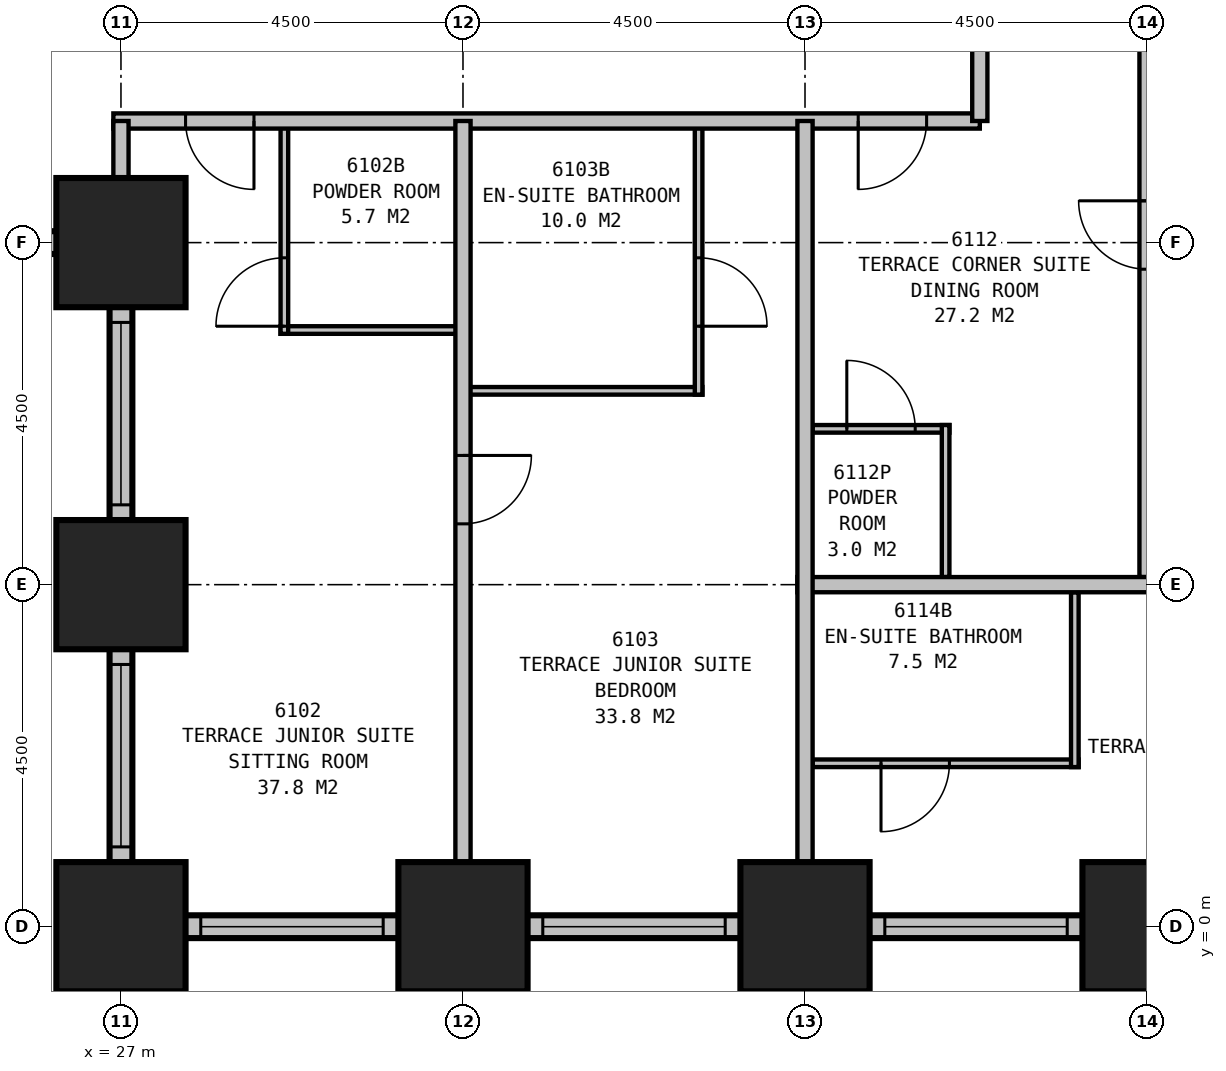
"""IFC4 building model, lengths in metres.
Left out: names, types, materials, properties, quantities, classifications, styles, units other than length and angle.
Written with IfcOpenShell. Run it as: python <this file> out.ifc"""

import sys

from ifc_helpers import new_model, si_unit, direction, frame, frame_2d, origin, origin_2d, place, context, subcontext, project, spatial, rectangle, extrude, element, fill, save


model = new_model("IFC4")
c1 = context("Model", 3, precision=1e-05, world=origin(), true_north=direction((0.0, 1.0)))
c2 = subcontext(c1, "Body", "Model", "MODEL_VIEW")
j1 = project(units=[si_unit("LENGTHUNIT", "METRE"), si_unit("PLANEANGLEUNIT", "RADIAN")], contexts=[c1])
p1 = place(None, origin())
s1 = spatial("IfcSite", under=j1, at=p1, CompositionType="ELEMENT")
p2 = place(p1, origin())
s2 = spatial("IfcBuilding", under=s1, at=p2, CompositionType="ELEMENT")
p3 = place(p2, frame((0.0, 0.0, 236.9)))
s3 = spatial("IfcBuildingStorey", under=s2, at=p3, CompositionType="ELEMENT", Elevation=236.9)
for number, where, z_axis, x_axis in (
    (1, (27.0, 9.0, 0.0), (0.0, 0.0, 1.0), (1.0, 0.0, 0.0)),
    (2, (27.0, 4.5, 0.0), (0.0, 0.0, 1.0), (1.0, 0.0, 0.0)),
    (3, (27.0, 0.0, 0.0), (0.0, 0.0, 1.0), (1.0, 0.0, 0.0)),
    (4, (31.5, 0.0, 0.0), (0.0, 0.0, 1.0), (1.0, 0.0, 0.0)),
    (5, (36.0, 0.0, 0.0), (0.0, 0.0, 1.0), (1.0, 0.0, 0.0)),
    (6, (40.5, 0.0, 0.0), (0.0, 0.0, 1.0), (1.0, 0.0, 0.0)),
):
    element("IfcColumn", number, at=place(p3, frame(where, z_axis=z_axis, x_axis=x_axis)), inside=s3, PredefinedType="COLUMN", context=c2, shape_type="SweptSolid", body=[
        extrude(rectangle(XDim=1.7, YDim=1.7, at=origin_2d()), origin(), (0.0, 0.0, 1.0), 3.9),
    ])
p4 = place(p3, frame((9.85, 9.0, 0.0), z_axis=(0.0, 0.0, 1.0), x_axis=(1.0, 0.0, 0.0)))
e7 = element("IfcWall", 7, at=p4, inside=s3, PredefinedType="STANDARD", context=c2, shape_type="SweptSolid", body=[
    extrude(rectangle(XDim=17.3, YDim=0.3, at=frame_2d((8.65, 0.0))), origin(), (0.0, 0.0, 1.0), 2.5),
])
p5 = place(p4, frame((1.15, 0.0, 0.5)))
e8 = element("IfcOpeningElement", 8, at=p5, cuts=e7, PredefinedType="OPENING", context=c2, shape_type="SweptSolid", body=[
    extrude(rectangle(XDim=1.5, YDim=1.85, at=frame_2d((0.75, 0.925))), frame((0.0, 0.16, 0.0), z_axis=(0.0, -1.0, 0.0), x_axis=(1.0, 0.0, 0.0)), (0.0, 0.0, 1.0), 0.32),
])
p6 = place(p4, frame((4.7, 0.0, 0.5)))
e9 = element("IfcOpeningElement", 9, at=p6, cuts=e7, PredefinedType="OPENING", context=c2, shape_type="SweptSolid", body=[
    extrude(rectangle(XDim=2.4, YDim=1.85, at=frame_2d((1.2, 0.925))), frame((0.0, 0.16, 0.0), z_axis=(0.0, -1.0, 0.0), x_axis=(1.0, 0.0, 0.0)), (0.0, 0.0, 1.0), 0.32),
])
p7 = place(p4, frame((9.2, 0.0, 0.5)))
e10 = element("IfcOpeningElement", 10, at=p7, cuts=e7, PredefinedType="OPENING", context=c2, shape_type="SweptSolid", body=[
    extrude(rectangle(XDim=2.4, YDim=1.85, at=frame_2d((1.2, 0.925))), frame((0.0, 0.16, 0.0), z_axis=(0.0, -1.0, 0.0), x_axis=(1.0, 0.0, 0.0)), (0.0, 0.0, 1.0), 0.32),
])
p8 = place(p4, frame((13.7, 0.0, 0.5)))
e11 = element("IfcOpeningElement", 11, at=p8, cuts=e7, PredefinedType="OPENING", context=c2, shape_type="SweptSolid", body=[
    extrude(rectangle(XDim=2.4, YDim=1.85, at=frame_2d((1.2, 0.925))), frame((0.0, 0.16, 0.0), z_axis=(0.0, -1.0, 0.0), x_axis=(1.0, 0.0, 0.0)), (0.0, 0.0, 1.0), 0.32),
])
p9 = place(p3, frame((27.0, 9.15, 0.0), z_axis=(0.0, 0.0, 1.0), x_axis=(0.0, -1.0, 0.0)))
e12 = element("IfcWall", 12, at=p9, inside=s3, PredefinedType="STANDARD", context=c2, shape_type="SweptSolid", body=[
    extrude(rectangle(XDim=9.3, YDim=0.3, at=frame_2d((4.65, 0.0))), origin(), (0.0, 0.0, 1.0), 2.5),
])
p10 = place(p9, frame((1.2, 0.0, 0.5)))
e13 = element("IfcOpeningElement", 13, at=p10, cuts=e12, PredefinedType="OPENING", context=c2, shape_type="SweptSolid", body=[
    extrude(rectangle(XDim=2.4, YDim=1.85, at=frame_2d((1.2, 0.925))), frame((0.0, 0.16, 0.0), z_axis=(0.0, -1.0, 0.0), x_axis=(1.0, 0.0, 0.0)), (0.0, 0.0, 1.0), 0.32),
])
p11 = place(p9, frame((5.7, 0.0, 0.5)))
e14 = element("IfcOpeningElement", 14, at=p11, cuts=e12, PredefinedType="OPENING", context=c2, shape_type="SweptSolid", body=[
    extrude(rectangle(XDim=2.4, YDim=1.85, at=frame_2d((1.2, 0.925))), frame((0.0, 0.16, 0.0), z_axis=(0.0, -1.0, 0.0), x_axis=(1.0, 0.0, 0.0)), (0.0, 0.0, 1.0), 0.32),
])
p12 = place(p3, frame((26.85, 0.0, 0.0), z_axis=(0.0, 0.0, 1.0), x_axis=(1.0, 0.0, 0.0)))
e15 = element("IfcWall", 15, at=p12, inside=s3, PredefinedType="STANDARD", context=c2, shape_type="SweptSolid", body=[
    extrude(rectangle(XDim=18.3, YDim=0.3, at=frame_2d((9.15, 0.0))), origin(), (0.0, 0.0, 1.0), 2.5),
])
p13 = place(p12, frame((1.2, 0.0, 0.5)))
e16 = element("IfcOpeningElement", 16, at=p13, cuts=e15, PredefinedType="OPENING", context=c2, shape_type="SweptSolid", body=[
    extrude(rectangle(XDim=2.4, YDim=1.85, at=frame_2d((1.2, 0.925))), frame((0.0, 0.16, 0.0), z_axis=(0.0, -1.0, 0.0), x_axis=(1.0, 0.0, 0.0)), (0.0, 0.0, 1.0), 0.32),
])
p14 = place(p12, frame((5.7, 0.0, 0.5)))
e17 = element("IfcOpeningElement", 17, at=p14, cuts=e15, PredefinedType="OPENING", context=c2, shape_type="SweptSolid", body=[
    extrude(rectangle(XDim=2.4, YDim=1.85, at=frame_2d((1.2, 0.925))), frame((0.0, 0.16, 0.0), z_axis=(0.0, -1.0, 0.0), x_axis=(1.0, 0.0, 0.0)), (0.0, 0.0, 1.0), 0.32),
])
p15 = place(p12, frame((10.2, 0.0, 0.5)))
e18 = element("IfcOpeningElement", 18, at=p15, cuts=e15, PredefinedType="OPENING", context=c2, shape_type="SweptSolid", body=[
    extrude(rectangle(XDim=2.4, YDim=1.85, at=frame_2d((1.2, 0.925))), frame((0.0, 0.16, 0.0), z_axis=(0.0, -1.0, 0.0), x_axis=(1.0, 0.0, 0.0)), (0.0, 0.0, 1.0), 0.32),
])
p16 = place(p12, frame((14.7, 0.0, 0.5)))
e19 = element("IfcOpeningElement", 19, at=p16, cuts=e15, PredefinedType="OPENING", context=c2, shape_type="SweptSolid", body=[
    extrude(rectangle(XDim=2.4, YDim=1.85, at=frame_2d((1.2, 0.925))), frame((0.0, 0.16, 0.0), z_axis=(0.0, -1.0, 0.0), x_axis=(1.0, 0.0, 0.0)), (0.0, 0.0, 1.0), 0.32),
])
p17 = place(p3, frame((26.9, 10.6, 0.0), z_axis=(0.0, 0.0, 1.0), x_axis=(1.0, 0.0, 0.0)))
e20 = element("IfcWall", 20, at=p17, inside=s3, PredefinedType="PARTITIONING", context=c2, shape_type="SweptSolid", body=[
    extrude(rectangle(XDim=11.4, YDim=0.2, at=frame_2d((5.7, 0.0))), origin(), (0.0, 0.0, 1.0), 3.65),
])
p18 = place(p17, frame((1.85, 0.0, 0.0), z_axis=(0.0, 0.0, 1.0), x_axis=(-1.0, 0.0, 0.0)))
e21 = element("IfcOpeningElement", 21, at=p18, cuts=e20, PredefinedType="OPENING", context=c2, shape_type="SweptSolid", body=[
    extrude(rectangle(XDim=0.9, YDim=2.1, at=frame_2d((0.45, 1.05))), frame((0.0, 0.11, 0.0), z_axis=(0.0, -1.0, 0.0), x_axis=(1.0, 0.0, 0.0)), (0.0, 0.0, 1.0), 0.22),
])
p19 = place(p17, frame((10.7, 0.0, 0.0), z_axis=(0.0, 0.0, 1.0), x_axis=(-1.0, 0.0, 0.0)))
e22 = element("IfcOpeningElement", 22, at=p19, cuts=e20, PredefinedType="OPENING", context=c2, shape_type="SweptSolid", body=[
    extrude(rectangle(XDim=0.9, YDim=2.1, at=frame_2d((0.45, 1.05))), frame((0.0, 0.11, 0.0), z_axis=(0.0, -1.0, 0.0), x_axis=(1.0, 0.0, 0.0)), (0.0, 0.0, 1.0), 0.22),
])
p20 = place(p3, frame((38.3, 10.6, 0.0), z_axis=(0.0, 0.0, 1.0), x_axis=(0.0, 1.0, 0.0)))
e23 = element("IfcWall", 23, at=p20, inside=s3, PredefinedType="PARTITIONING", context=c2, shape_type="SweptSolid", body=[
    extrude(rectangle(XDim=18.7, YDim=0.2, at=frame_2d((9.35, 0.0))), origin(), (0.0, 0.0, 1.0), 3.65),
])
p21 = place(p20, frame((6.55, 0.0, 0.0), z_axis=(0.0, 0.0, 1.0), x_axis=(-1.0, 0.0, 0.0)))
e24 = element("IfcOpeningElement", 24, at=p21, cuts=e23, PredefinedType="OPENING", context=c2, shape_type="SweptSolid", body=[
    extrude(rectangle(XDim=0.9, YDim=2.1, at=frame_2d((0.45, 1.05))), frame((0.0, 0.11, 0.0), z_axis=(0.0, -1.0, 0.0), x_axis=(1.0, 0.0, 0.0)), (0.0, 0.0, 1.0), 0.22),
])
p22 = place(p20, frame((16.1, 0.0, 0.0), z_axis=(0.0, 0.0, 1.0), x_axis=(-1.0, 0.0, 0.0)))
e25 = element("IfcOpeningElement", 25, at=p22, cuts=e23, PredefinedType="OPENING", context=c2, shape_type="SweptSolid", body=[
    extrude(rectangle(XDim=1.0, YDim=2.1, at=frame_2d((0.5, 1.05))), frame((0.0, 0.11, 0.0), z_axis=(0.0, -1.0, 0.0), x_axis=(1.0, 0.0, 0.0)), (0.0, 0.0, 1.0), 0.22),
])
p23 = place(p3, frame((27.0, 10.6, 0.0), z_axis=(0.0, 0.0, 1.0), x_axis=(0.0, -1.0, 0.0)))
e26 = element("IfcWall", 26, at=p23, inside=s3, PredefinedType="PARTITIONING", context=c2, shape_type="SweptSolid", body=[
    extrude(rectangle(XDim=1.6, YDim=0.2, at=frame_2d((0.8, 0.0))), origin(), (0.0, 0.0, 1.0), 2.65),
])
p24 = place(p3, frame((31.5, 10.6, 0.0), z_axis=(0.0, 0.0, 1.0), x_axis=(0.0, -1.0, 0.0)))
e27 = element("IfcWall", 27, at=p24, inside=s3, PredefinedType="PARTITIONING", context=c2, shape_type="SweptSolid", body=[
    extrude(rectangle(XDim=10.6, YDim=0.2, at=frame_2d((5.3, 0.0))), origin(), (0.0, 0.0, 1.0), 2.65),
])
p25 = place(p24, frame((4.4, 0.0, 0.0)))
e28 = element("IfcOpeningElement", 28, at=p25, cuts=e27, PredefinedType="OPENING", context=c2, shape_type="SweptSolid", body=[
    extrude(rectangle(XDim=0.9, YDim=2.1, at=frame_2d((0.45, 1.05))), frame((0.0, 0.11, 0.0), z_axis=(0.0, -1.0, 0.0), x_axis=(1.0, 0.0, 0.0)), (0.0, 0.0, 1.0), 0.22),
])
p26 = place(p3, frame((29.1, 7.85, 0.0), z_axis=(0.0, 0.0, 1.0), x_axis=(1.0, 0.0, 0.0)))
e29 = element("IfcWall", 29, at=p26, inside=s3, PredefinedType="PLUMBINGWALL", context=c2, shape_type="SweptSolid", body=[
    extrude(rectangle(XDim=2.4, YDim=0.1, at=frame_2d((1.2, 0.0))), origin(), (0.0, 0.0, 1.0), 3.65),
])
p27 = place(p3, frame((29.15, 10.6, 0.0), z_axis=(0.0, 0.0, 1.0), x_axis=(0.0, -1.0, 0.0)))
e30 = element("IfcWall", 30, at=p27, inside=s3, PredefinedType="PLUMBINGWALL", context=c2, shape_type="SweptSolid", body=[
    extrude(rectangle(XDim=2.8, YDim=0.1, at=frame_2d((1.4, 0.0))), origin(), (0.0, 0.0, 1.0), 3.65),
])
p28 = place(p27, frame((2.7, 0.0, 0.0), z_axis=(0.0, 0.0, 1.0), x_axis=(-1.0, 0.0, 0.0)))
e31 = element("IfcOpeningElement", 31, at=p28, cuts=e30, PredefinedType="OPENING", context=c2, shape_type="SweptSolid", body=[
    extrude(rectangle(XDim=0.9, YDim=2.1, at=frame_2d((0.45, 1.05))), frame((0.0, 0.06, 0.0), z_axis=(0.0, -1.0, 0.0), x_axis=(1.0, 0.0, 0.0)), (0.0, 0.0, 1.0), 0.12),
])
p29 = place(p3, frame((31.5, 7.05, 0.0), z_axis=(0.0, 0.0, 1.0), x_axis=(1.0, 0.0, 0.0)))
e32 = element("IfcWall", 32, at=p29, inside=s3, PredefinedType="PLUMBINGWALL", context=c2, shape_type="SweptSolid", body=[
    extrude(rectangle(XDim=3.15, YDim=0.1, at=frame_2d((1.575, 0.0))), origin(), (0.0, 0.0, 1.0), 3.65),
])
p30 = place(p3, frame((34.6, 10.6, 0.0), z_axis=(0.0, 0.0, 1.0), x_axis=(0.0, -1.0, 0.0)))
e33 = element("IfcWall", 33, at=p30, inside=s3, PredefinedType="PLUMBINGWALL", context=c2, shape_type="SweptSolid", body=[
    extrude(rectangle(XDim=3.6, YDim=0.1, at=frame_2d((1.8, 0.0))), origin(), (0.0, 0.0, 1.0), 3.65),
])
p31 = place(p30, frame((1.8, 0.0, 0.0)))
e34 = element("IfcOpeningElement", 34, at=p31, cuts=e33, PredefinedType="OPENING", context=c2, shape_type="SweptSolid", body=[
    extrude(rectangle(XDim=0.9, YDim=2.1, at=frame_2d((0.45, 1.05))), frame((0.0, 0.06, 0.0), z_axis=(0.0, -1.0, 0.0), x_axis=(1.0, 0.0, 0.0)), (0.0, 0.0, 1.0), 0.12),
])
p32 = place(p3, frame((36.0, 10.6, 0.0), z_axis=(0.0, 0.0, 1.0), x_axis=(0.0, -1.0, 0.0)))
e35 = element("IfcWall", 35, at=p32, inside=s3, PredefinedType="PARTITIONING", context=c2, shape_type="SweptSolid", body=[
    extrude(rectangle(XDim=10.6, YDim=0.2, at=frame_2d((5.3, 0.0))), origin(), (0.0, 0.0, 1.0), 2.65),
])
p33 = place(p3, frame((35.9, 4.5, 0.0), z_axis=(0.0, 0.0, 1.0), x_axis=(1.0, 0.0, 0.0)))
e36 = element("IfcWall", 36, at=p33, inside=s3, PredefinedType="PARTITIONING", context=c2, shape_type="SweptSolid", body=[
    extrude(rectangle(XDim=9.1, YDim=0.2, at=frame_2d((4.55, 0.0))), origin(), (0.0, 0.0, 1.0), 3.65),
])
p34 = place(p33, frame((7.1, 0.0, 0.0)))
e37 = element("IfcOpeningElement", 37, at=p34, cuts=e36, PredefinedType="OPENING", context=c2, shape_type="SweptSolid", body=[
    extrude(rectangle(XDim=0.9, YDim=2.1, at=frame_2d((0.45, 1.05))), frame((0.0, 0.11, 0.0), z_axis=(0.0, -1.0, 0.0), x_axis=(1.0, 0.0, 0.0)), (0.0, 0.0, 1.0), 0.22),
])
p35 = place(p3, frame((40.5, 4.6, 0.0), z_axis=(0.0, 0.0, 1.0), x_axis=(0.0, 1.0, 0.0)))
e38 = element("IfcWall", 38, at=p35, inside=s3, PredefinedType="PARTITIONING", context=c2, shape_type="SweptSolid", body=[
    extrude(rectangle(XDim=8.8, YDim=0.2, at=frame_2d((4.4, 0.0))), origin(), (0.0, 0.0, 1.0), 2.65),
])
p36 = place(p35, frame((4.05, 0.0, 0.0)))
e39 = element("IfcOpeningElement", 39, at=p36, cuts=e38, PredefinedType="OPENING", context=c2, shape_type="SweptSolid", body=[
    extrude(rectangle(XDim=0.9, YDim=2.1, at=frame_2d((0.45, 1.05))), frame((0.0, 0.11, 0.0), z_axis=(0.0, -1.0, 0.0), x_axis=(1.0, 0.0, 0.0)), (0.0, 0.0, 1.0), 0.22),
])
p37 = place(p3, frame((37.85, 4.6, 0.0), z_axis=(0.0, 0.0, 1.0), x_axis=(0.0, 1.0, 0.0)))
e40 = element("IfcWall", 40, at=p37, inside=s3, PredefinedType="PLUMBINGWALL", context=c2, shape_type="SweptSolid", body=[
    extrude(rectangle(XDim=2.0, YDim=0.1, at=frame_2d((1.0, 0.0))), origin(), (0.0, 0.0, 1.0), 3.65),
])
p38 = place(p3, frame((36.1, 6.55, 0.0), z_axis=(0.0, 0.0, 1.0), x_axis=(1.0, 0.0, 0.0)))
e41 = element("IfcWall", 41, at=p38, inside=s3, PredefinedType="PLUMBINGWALL", context=c2, shape_type="SweptSolid", body=[
    extrude(rectangle(XDim=1.8, YDim=0.1, at=frame_2d((0.9, 0.0))), origin(), (0.0, 0.0, 1.0), 3.65),
])
p39 = place(p38, frame((0.45, 0.0, 0.0)))
e42 = element("IfcOpeningElement", 42, at=p39, cuts=e41, PredefinedType="OPENING", context=c2, shape_type="SweptSolid", body=[
    extrude(rectangle(XDim=0.9, YDim=2.1, at=frame_2d((0.45, 1.05))), frame((0.0, 0.06, 0.0), z_axis=(0.0, -1.0, 0.0), x_axis=(1.0, 0.0, 0.0)), (0.0, 0.0, 1.0), 0.12),
])
p40 = place(p3, frame((39.55, 4.4, 0.0), z_axis=(0.0, 0.0, 1.0), x_axis=(0.0, -1.0, 0.0)))
e43 = element("IfcWall", 43, at=p40, inside=s3, PredefinedType="PLUMBINGWALL", context=c2, shape_type="SweptSolid", body=[
    extrude(rectangle(XDim=2.3, YDim=0.1, at=frame_2d((1.15, 0.0))), origin(), (0.0, 0.0, 1.0), 3.65),
])
p41 = place(p3, frame((36.1, 2.15, 0.0), z_axis=(0.0, 0.0, 1.0), x_axis=(1.0, 0.0, 0.0)))
e44 = element("IfcWall", 44, at=p41, inside=s3, PredefinedType="PLUMBINGWALL", context=c2, shape_type="SweptSolid", body=[
    extrude(rectangle(XDim=3.5, YDim=0.1, at=frame_2d((1.75, 0.0))), origin(), (0.0, 0.0, 1.0), 3.65),
])
p42 = place(p41, frame((1.8, 0.0, 0.0), z_axis=(0.0, 0.0, 1.0), x_axis=(-1.0, 0.0, 0.0)))
e45 = element("IfcOpeningElement", 45, at=p42, cuts=e44, PredefinedType="OPENING", context=c2, shape_type="SweptSolid", body=[
    extrude(rectangle(XDim=0.9, YDim=2.1, at=frame_2d((0.45, 1.05))), frame((0.0, 0.06, 0.0), z_axis=(0.0, -1.0, 0.0), x_axis=(1.0, 0.0, 0.0)), (0.0, 0.0, 1.0), 0.12),
])
p43 = place(p10, origin())
e46 = element("IfcWindow", 46, at=p43, inside=s3, PartitioningType="SINGLE_PANEL", PredefinedType="WINDOW", context=c2, shape_type="SweptSolid", body=[
    extrude(rectangle(XDim=2.4, YDim=1.85, at=frame_2d((1.2, 0.925))), frame((0.0, 0.03, 0.0), z_axis=(0.0, -1.0, 0.0), x_axis=(1.0, 0.0, 0.0)), (0.0, 0.0, 1.0), 0.06),
])
fill(e13, e46)
p44 = place(p11, origin())
e47 = element("IfcWindow", 47, at=p44, inside=s3, PartitioningType="SINGLE_PANEL", PredefinedType="WINDOW", context=c2, shape_type="SweptSolid", body=[
    extrude(rectangle(XDim=2.4, YDim=1.85, at=frame_2d((1.2, 0.925))), frame((0.0, 0.03, 0.0), z_axis=(0.0, -1.0, 0.0), x_axis=(1.0, 0.0, 0.0)), (0.0, 0.0, 1.0), 0.06),
])
fill(e14, e47)
p45 = place(p13, origin())
e48 = element("IfcWindow", 48, at=p45, inside=s3, PartitioningType="SINGLE_PANEL", PredefinedType="WINDOW", context=c2, shape_type="SweptSolid", body=[
    extrude(rectangle(XDim=2.4, YDim=1.85, at=frame_2d((1.2, 0.925))), frame((0.0, 0.03, 0.0), z_axis=(0.0, -1.0, 0.0), x_axis=(1.0, 0.0, 0.0)), (0.0, 0.0, 1.0), 0.06),
])
fill(e16, e48)
p46 = place(p14, origin())
e49 = element("IfcWindow", 49, at=p46, inside=s3, PartitioningType="SINGLE_PANEL", PredefinedType="WINDOW", context=c2, shape_type="SweptSolid", body=[
    extrude(rectangle(XDim=2.4, YDim=1.85, at=frame_2d((1.2, 0.925))), frame((0.0, 0.03, 0.0), z_axis=(0.0, -1.0, 0.0), x_axis=(1.0, 0.0, 0.0)), (0.0, 0.0, 1.0), 0.06),
])
fill(e17, e49)
p47 = place(p15, origin())
e50 = element("IfcWindow", 50, at=p47, inside=s3, PartitioningType="SINGLE_PANEL", PredefinedType="WINDOW", context=c2, shape_type="SweptSolid", body=[
    extrude(rectangle(XDim=2.4, YDim=1.85, at=frame_2d((1.2, 0.925))), frame((0.0, 0.03, 0.0), z_axis=(0.0, -1.0, 0.0), x_axis=(1.0, 0.0, 0.0)), (0.0, 0.0, 1.0), 0.06),
])
fill(e18, e50)
p48 = place(p18, origin())
e51 = element("IfcDoor", 51, at=p48, inside=s3, OperationType="SINGLE_SWING_LEFT", PredefinedType="DOOR", context=c2, shape_type="SweptSolid", body=[
    extrude(rectangle(XDim=0.9, YDim=2.1, at=frame_2d((0.45, 1.05))), frame((0.0, 0.025, 0.0), z_axis=(0.0, -1.0, 0.0), x_axis=(1.0, 0.0, 0.0)), (0.0, 0.0, 1.0), 0.05),
])
fill(e21, e51)
p49 = place(p19, origin())
e52 = element("IfcDoor", 52, at=p49, inside=s3, OperationType="SINGLE_SWING_RIGHT", PredefinedType="DOOR", context=c2, shape_type="SweptSolid", body=[
    extrude(rectangle(XDim=0.9, YDim=2.1, at=frame_2d((0.45, 1.05))), frame((0.0, 0.025, 0.0), z_axis=(0.0, -1.0, 0.0), x_axis=(1.0, 0.0, 0.0)), (0.0, 0.0, 1.0), 0.05),
])
fill(e22, e52)
p50 = place(p25, origin())
e53 = element("IfcDoor", 53, at=p50, inside=s3, OperationType="SINGLE_SWING_LEFT", PredefinedType="DOOR", context=c2, shape_type="SweptSolid", body=[
    extrude(rectangle(XDim=0.9, YDim=2.1, at=frame_2d((0.45, 1.05))), frame((0.0, 0.025, 0.0), z_axis=(0.0, -1.0, 0.0), x_axis=(1.0, 0.0, 0.0)), (0.0, 0.0, 1.0), 0.05),
])
fill(e28, e53)
p51 = place(p28, origin())
e54 = element("IfcDoor", 54, at=p51, inside=s3, OperationType="SINGLE_SWING_LEFT", PredefinedType="DOOR", context=c2, shape_type="SweptSolid", body=[
    extrude(rectangle(XDim=0.9, YDim=2.1, at=frame_2d((0.45, 1.05))), frame((0.0, 0.025, 0.0), z_axis=(0.0, -1.0, 0.0), x_axis=(1.0, 0.0, 0.0)), (0.0, 0.0, 1.0), 0.05),
])
fill(e31, e54)
p52 = place(p31, origin())
e55 = element("IfcDoor", 55, at=p52, inside=s3, OperationType="SINGLE_SWING_RIGHT", PredefinedType="DOOR", context=c2, shape_type="SweptSolid", body=[
    extrude(rectangle(XDim=0.9, YDim=2.1, at=frame_2d((0.45, 1.05))), frame((0.0, 0.025, 0.0), z_axis=(0.0, -1.0, 0.0), x_axis=(1.0, 0.0, 0.0)), (0.0, 0.0, 1.0), 0.05),
])
fill(e34, e55)
p53 = place(p36, origin())
e56 = element("IfcDoor", 56, at=p53, inside=s3, OperationType="SINGLE_SWING_RIGHT", PredefinedType="DOOR", context=c2, shape_type="SweptSolid", body=[
    extrude(rectangle(XDim=0.9, YDim=2.1, at=frame_2d((0.45, 1.05))), frame((0.0, 0.025, 0.0), z_axis=(0.0, -1.0, 0.0), x_axis=(1.0, 0.0, 0.0)), (0.0, 0.0, 1.0), 0.05),
])
fill(e39, e56)
p54 = place(p39, origin())
e57 = element("IfcDoor", 57, at=p54, inside=s3, OperationType="SINGLE_SWING_LEFT", PredefinedType="DOOR", context=c2, shape_type="SweptSolid", body=[
    extrude(rectangle(XDim=0.9, YDim=2.1, at=frame_2d((0.45, 1.05))), frame((0.0, 0.025, 0.0), z_axis=(0.0, -1.0, 0.0), x_axis=(1.0, 0.0, 0.0)), (0.0, 0.0, 1.0), 0.05),
])
fill(e42, e57)
p55 = place(p42, origin())
e58 = element("IfcDoor", 58, at=p55, inside=s3, OperationType="SINGLE_SWING_RIGHT", PredefinedType="DOOR", context=c2, shape_type="SweptSolid", body=[
    extrude(rectangle(XDim=0.9, YDim=2.1, at=frame_2d((0.45, 1.05))), frame((0.0, 0.025, 0.0), z_axis=(0.0, -1.0, 0.0), x_axis=(1.0, 0.0, 0.0)), (0.0, 0.0, 1.0), 0.05),
])
fill(e45, e58)
save(model, sys.argv[1])
